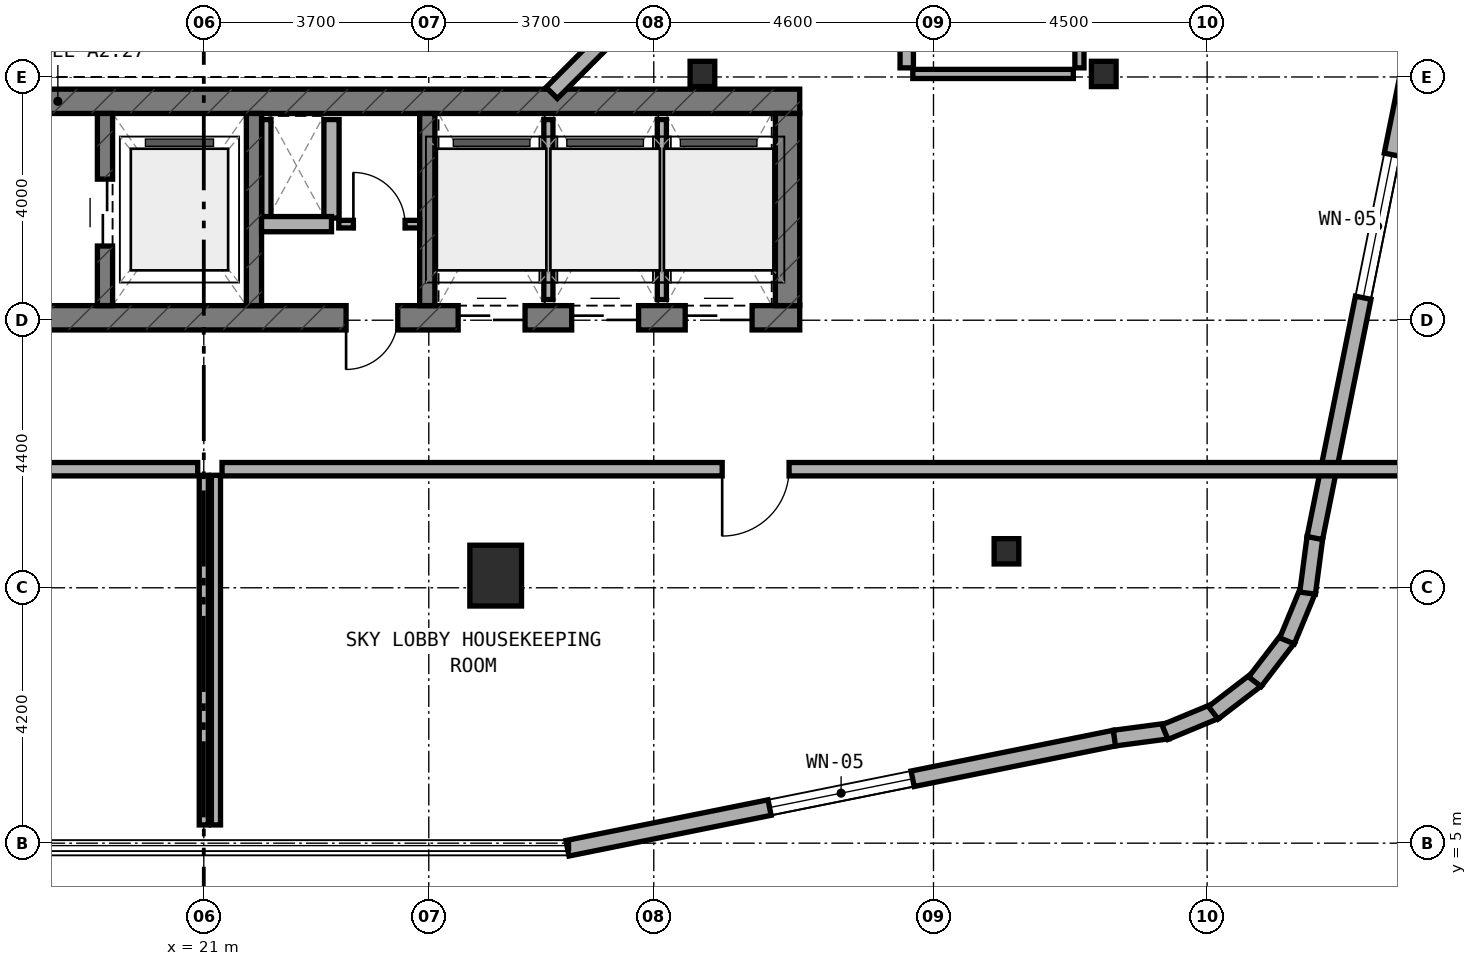
"""IFC4 building model, lengths in metres.
Left out: names, types, materials, properties, quantities, classifications, styles, units other than length and angle.
Written with IfcOpenShell. Run it as: python <this file> out.ifc"""

import sys

from ifc_helpers import new_model, si_unit, direction, frame, frame_2d, origin, origin_2d, place, context, subcontext, project, spatial, rectangle, i_section, extrude, element, fill, save


model = new_model("IFC4")
c1 = context("Model", 3, precision=1e-05, world=origin(), true_north=direction((0.0, 1.0)))
c2 = subcontext(c1, "Body", "Model", "MODEL_VIEW")
j1 = project(units=[si_unit("LENGTHUNIT", "METRE"), si_unit("PLANEANGLEUNIT", "RADIAN")], contexts=[c1])
p1 = place(None, origin())
s1 = spatial("IfcSite", under=j1, at=p1, CompositionType="ELEMENT")
p2 = place(p1, origin())
s2 = spatial("IfcBuilding", under=s1, at=p2, CompositionType="ELEMENT")
p3 = place(p2, frame((0.0, 0.0, 119.5)))
s3 = spatial("IfcBuildingStorey", under=s2, at=p3, CompositionType="ELEMENT", Elevation=119.5)
p4 = place(p3, frame((6.4, 13.64, 0.0), z_axis=(0.0, 0.0, 1.0), x_axis=(1.0, 0.0, 0.0)))
e1 = element("IfcWall", 1, at=p4, inside=s3, PredefinedType="SHEAR", context=c2, shape_type="SweptSolid", body=[
    extrude(rectangle(XDim=24.4, YDim=0.4, at=frame_2d((12.2, 0.0))), origin(), (0.0, 0.0, 1.0), 4.5),
])
p5 = place(p4, frame((9.15, 0.0, 0.0)))
e2 = element("IfcOpeningElement", 2, at=p5, cuts=e1, PredefinedType="OPENING", context=c2, shape_type="SweptSolid", body=[
    extrude(rectangle(XDim=1.2, YDim=2.15, at=frame_2d((0.6, 1.075))), frame((0.0, 0.21, 0.0), z_axis=(0.0, -1.0, 0.0), x_axis=(1.0, 0.0, 0.0)), (0.0, 0.0, 1.0), 0.42),
])
p6 = place(p4, frame((16.94, 0.0, 0.0)))
e3 = element("IfcOpeningElement", 3, at=p6, cuts=e1, PredefinedType="OPENING", context=c2, shape_type="SweptSolid", body=[
    extrude(rectangle(XDim=0.85, YDim=2.1, at=frame_2d((0.425, 1.05))), frame((0.0, 0.21, 0.0), z_axis=(0.0, -1.0, 0.0), x_axis=(1.0, 0.0, 0.0)), (0.0, 0.0, 1.0), 0.42),
])
p7 = place(p4, frame((18.783, 0.0, 0.0)))
e4 = element("IfcOpeningElement", 4, at=p7, cuts=e1, PredefinedType="OPENING", context=c2, shape_type="SweptSolid", body=[
    extrude(rectangle(XDim=1.1, YDim=2.15, at=frame_2d((0.55, 1.075))), frame((0.0, 0.21, 0.0), z_axis=(0.0, -1.0, 0.0), x_axis=(1.0, 0.0, 0.0)), (0.0, 0.0, 1.0), 0.42),
])
p8 = place(p4, frame((20.65, 0.0, 0.0)))
e5 = element("IfcOpeningElement", 5, at=p8, cuts=e1, PredefinedType="OPENING", context=c2, shape_type="SweptSolid", body=[
    extrude(rectangle(XDim=1.1, YDim=2.15, at=frame_2d((0.55, 1.075))), frame((0.0, 0.21, 0.0), z_axis=(0.0, -1.0, 0.0), x_axis=(1.0, 0.0, 0.0)), (0.0, 0.0, 1.0), 0.42),
])
p9 = place(p4, frame((22.517, 0.0, 0.0)))
e6 = element("IfcOpeningElement", 6, at=p9, cuts=e1, PredefinedType="OPENING", context=c2, shape_type="SweptSolid", body=[
    extrude(rectangle(XDim=1.1, YDim=2.15, at=frame_2d((0.55, 1.075))), frame((0.0, 0.21, 0.0), z_axis=(0.0, -1.0, 0.0), x_axis=(1.0, 0.0, 0.0)), (0.0, 0.0, 1.0), 0.42),
])
p10 = place(p3, frame((6.4, 17.2, 0.0), z_axis=(0.0, 0.0, 1.0), x_axis=(1.0, 0.0, 0.0)))
e7 = element("IfcWall", 7, at=p10, inside=s3, PredefinedType="SHEAR", context=c2, shape_type="SweptSolid", body=[
    extrude(rectangle(XDim=24.4, YDim=0.4, at=frame_2d((12.2, 0.0))), origin(), (0.0, 0.0, 1.0), 4.5),
])
p11 = place(p3, frame((30.6, 13.84, 0.0), z_axis=(0.0, 0.0, 1.0), x_axis=(0.0, 1.0, 0.0)))
e8 = element("IfcWall", 8, at=p11, inside=s3, PredefinedType="SHEAR", context=c2, shape_type="SweptSolid", body=[
    extrude(rectangle(XDim=3.16, YDim=0.4, at=frame_2d((1.58, 0.0))), origin(), (0.0, 0.0, 1.0), 4.5),
])
p12 = place(p3, frame((19.375, 13.84, 0.0), z_axis=(0.0, 0.0, 1.0), x_axis=(0.0, 1.0, 0.0)))
e9 = element("IfcWall", 9, at=p12, inside=s3, PredefinedType="STANDARD", context=c2, shape_type="SweptSolid", body=[
    extrude(rectangle(XDim=3.16, YDim=0.25, at=frame_2d((1.58, 0.0))), origin(), (0.0, 0.0, 1.0), 4.22),
])
p13 = place(p12, frame((0.98, 0.0, 0.0)))
e10 = element("IfcOpeningElement", 10, at=p13, cuts=e9, PredefinedType="OPENING", context=c2, shape_type="SweptSolid", body=[
    extrude(rectangle(XDim=1.1, YDim=2.15, at=frame_2d((0.55, 1.075))), frame((0.0, 0.135, 0.0), z_axis=(0.0, -1.0, 0.0), x_axis=(1.0, 0.0, 0.0)), (0.0, 0.0, 1.0), 0.27),
])
for number, where, z_axis, x_axis in (
    (11, (21.825, 13.84, 0.0), (0.0, 0.0, 1.0), (0.0, 1.0, 0.0)),
    (12, (24.675, 13.84, 0.0), (0.0, 0.0, 1.0), (0.0, 1.0, 0.0)),
):
    element("IfcWall", number, at=place(p3, frame(where, z_axis=z_axis, x_axis=x_axis)), inside=s3, PredefinedType="STANDARD", context=c2, shape_type="SweptSolid", body=[
        extrude(rectangle(XDim=3.16, YDim=0.25, at=frame_2d((1.58, 0.0))), origin(), (0.0, 0.0, 1.0), 4.22),
    ])
p14 = place(p3, frame((25.8, 9.4, 0.0), z_axis=(0.0, 0.0, 1.0), x_axis=(1.0, 0.0, 0.0)))
e13 = element("IfcColumn", 13, at=p14, inside=s3, PredefinedType="COLUMN", context=c2, shape_type="SweptSolid", body=[
    extrude(rectangle(XDim=0.85, YDim=1.0, at=origin_2d()), origin(), (0.0, 0.0, 1.0), 4.5),
])
for number, where, z_axis, x_axis in (
    (14, (34.2, 9.8, 0.0), (0.0, 0.0, 1.0), (1.0, 0.0, 0.0)),
    (15, (35.8, 17.65, 0.0), (0.0, 0.0, 1.0), (1.0, 0.0, 0.0)),
    (16, (29.2, 17.65, 0.0), (0.0, 0.0, 1.0), (1.0, 0.0, 0.0)),
):
    element("IfcColumn", number, at=place(p3, frame(where, z_axis=z_axis, x_axis=x_axis)), inside=s3, PredefinedType="COLUMN", context=c2, shape_type="SweptSolid", body=[
        extrude(i_section(OverallWidth=0.406, OverallDepth=0.416, WebThickness=0.024, FlangeThickness=0.039, FilletRadius=0.015, at=origin_2d()), origin(), (0.0, 0.0, 1.0), 4.5),
    ])
p15 = place(p3, frame((26.98, 4.916, 0.0), z_axis=(0.0, 0.0, 1.0), x_axis=(0.980315963543, 0.197435082048, 0.0)))
e17 = element("IfcWall", 17, at=p15, inside=s3, PredefinedType="STANDARD", context=c2, shape_type="SweptSolid", body=[
    extrude(rectangle(XDim=9.183, YDim=0.26, at=frame_2d((4.591, 0.0))), origin(), (0.0, 0.0, 1.0), 4.22),
])
p16 = place(p15, frame((3.391, 0.0, 0.8)))
e18 = element("IfcOpeningElement", 18, at=p16, cuts=e17, PredefinedType="OPENING", context=c2, shape_type="SweptSolid", body=[
    extrude(rectangle(XDim=2.4, YDim=1.6, at=frame_2d((1.2, 0.8))), frame((0.0, 0.14, 0.0), z_axis=(0.0, -1.0, 0.0), x_axis=(1.0, 0.0, 0.0)), (0.0, 0.0, 1.0), 0.28),
])
p17 = place(p3, frame((35.975, 6.728, 0.0), z_axis=(0.0, 0.0, 1.0), x_axis=(0.991388484223, 0.130953706898, 0.0)))
e19 = element("IfcWall", 19, at=p17, inside=s3, PredefinedType="STANDARD", context=c2, shape_type="SweptSolid", body=[
    extrude(rectangle(XDim=0.885, YDim=0.26, at=frame_2d((0.443, 0.0))), origin(), (0.0, 0.0, 1.0), 4.22),
])
p18 = place(p3, frame((36.807, 6.826, 0.0), z_axis=(0.0, 0.0, 1.0), x_axis=(0.923627776508, 0.383290660547, 0.0)))
e20 = element("IfcWall", 20, at=p18, inside=s3, PredefinedType="STANDARD", context=c2, shape_type="SweptSolid", body=[
    extrude(rectangle(XDim=0.903, YDim=0.26, at=frame_2d((0.452, 0.0))), origin(), (0.0, 0.0, 1.0), 4.22),
])
p19 = place(p3, frame((37.601, 7.144, 0.0), z_axis=(0.0, 0.0, 1.0), x_axis=(0.793458244748, 0.608624690463, 0.0)))
e21 = element("IfcWall", 21, at=p19, inside=s3, PredefinedType="STANDARD", context=c2, shape_type="SweptSolid", body=[
    extrude(rectangle(XDim=0.902, YDim=0.26, at=frame_2d((0.451, 0.0))), origin(), (0.0, 0.0, 1.0), 4.22),
])
p20 = place(p3, frame((38.286, 7.655, 0.0), z_axis=(0.0, 0.0, 1.0), x_axis=(0.608494022858, 0.793558456666, 0.0)))
e22 = element("IfcWall", 22, at=p20, inside=s3, PredefinedType="STANDARD", context=c2, shape_type="SweptSolid", body=[
    extrude(rectangle(XDim=0.902, YDim=0.26, at=frame_2d((0.451, 0.0))), origin(), (0.0, 0.0, 1.0), 4.22),
])
p21 = place(p3, frame((38.814, 8.327, 0.0), z_axis=(0.0, 0.0, 1.0), x_axis=(0.383155708213, 0.923683767999, 0.0)))
e23 = element("IfcWall", 23, at=p21, inside=s3, PredefinedType="STANDARD", context=c2, shape_type="SweptSolid", body=[
    extrude(rectangle(XDim=0.903, YDim=0.26, at=frame_2d((0.451, 0.0))), origin(), (0.0, 0.0, 1.0), 4.22),
])
p22 = place(p3, frame((39.152, 9.112, 0.0), z_axis=(0.0, 0.0, 1.0), x_axis=(0.130200706103, 0.991487658083, 0.0)))
e24 = element("IfcWall", 24, at=p22, inside=s3, PredefinedType="STANDARD", context=c2, shape_type="SweptSolid", body=[
    extrude(rectangle(XDim=0.921, YDim=0.26, at=frame_2d((0.46, 0.0))), origin(), (0.0, 0.0, 1.0), 4.22),
])
p23 = place(p3, frame((39.271, 10.018, 0.0), z_axis=(0.0, 0.0, 1.0), x_axis=(0.197435082048, 0.980315963543, 0.0)))
e25 = element("IfcWall", 25, at=p23, inside=s3, PredefinedType="STANDARD", context=c2, shape_type="SweptSolid", body=[
    extrude(rectangle(XDim=9.183, YDim=0.26, at=frame_2d((4.591, 0.0))), origin(), (0.0, 0.0, 1.0), 4.22),
])
p24 = place(p23, frame((4.031, 0.0, 0.8)))
e26 = element("IfcOpeningElement", 26, at=p24, cuts=e25, PredefinedType="OPENING", context=c2, shape_type="SweptSolid", body=[
    extrude(rectangle(XDim=2.4, YDim=1.6, at=frame_2d((1.2, 0.8))), frame((0.0, 0.14, 0.0), z_axis=(0.0, -1.0, 0.0), x_axis=(1.0, 0.0, 0.0)), (0.0, 0.0, 1.0), 0.28),
])
p25 = place(p3, frame((26.722, 17.338, 0.0), z_axis=(0.0, 0.0, 1.0), x_axis=(0.707059717605, 0.707153841636, 0.0)))
e27 = element("IfcWall", 27, at=p25, inside=s3, PredefinedType="STANDARD", context=c2, shape_type="SweptSolid", body=[
    extrude(rectangle(XDim=2.594, YDim=0.26, at=frame_2d((1.297, 0.0))), origin(), (0.0, 0.0, 1.0), 4.22),
])
p26 = place(p3, frame((22.03, 15.28, 0.0), z_axis=(0.0, 0.0, 1.0), x_axis=(0.0, 1.0, 0.0)))
e28 = element("IfcWall", 28, at=p26, inside=s3, PredefinedType="PARTITIONING", context=c2, shape_type="SweptSolid", body=[
    extrude(rectangle(XDim=1.62, YDim=0.15, at=frame_2d((0.81, 0.0))), origin(), (0.0, 0.0, 1.0), 4.22),
])
p27 = place(p3, frame((23.1, 15.28, 0.0), z_axis=(0.0, 0.0, 1.0), x_axis=(0.0, 1.0, 0.0)))
e29 = element("IfcWall", 29, at=p27, inside=s3, PredefinedType="SOLIDWALL", context=c2, shape_type="SweptSolid", body=[
    extrude(rectangle(XDim=1.62, YDim=0.25, at=frame_2d((0.81, 0.0))), origin(), (0.0, 0.0, 1.0), 4.22),
])
p28 = place(p3, frame((21.95, 15.18, 0.0), z_axis=(0.0, 0.0, 1.0), x_axis=(1.0, 0.0, 0.0)))
e30 = element("IfcWall", 30, at=p28, inside=s3, PredefinedType="SOLIDWALL", context=c2, shape_type="SweptSolid", body=[
    extrude(rectangle(XDim=1.15, YDim=0.25, at=frame_2d((0.575, 0.0))), origin(), (0.0, 0.0, 1.0), 4.22),
])
p29 = place(p3, frame((23.22, 15.18, 0.0), z_axis=(0.0, 0.0, 1.0), x_axis=(1.0, 0.0, 0.0)))
e31 = element("IfcWall", 31, at=p29, inside=s3, PredefinedType="PARTITIONING", context=c2, shape_type="SweptSolid", body=[
    extrude(rectangle(XDim=1.33, YDim=0.125, at=frame_2d((0.665, 0.0))), origin(), (0.0, 0.0, 1.0), 4.22),
])
p30 = place(p29, frame((0.24, 0.0, 0.0)))
e32 = element("IfcOpeningElement", 32, at=p30, cuts=e31, PredefinedType="OPENING", context=c2, shape_type="SweptSolid", body=[
    extrude(rectangle(XDim=0.85, YDim=2.1, at=frame_2d((0.425, 1.05))), frame((0.0, 0.073, 0.0), z_axis=(0.0, -1.0, 0.0), x_axis=(1.0, 0.0, 0.0)), (0.0, 0.0, 1.0), 0.145),
])
p31 = place(p3, frame((26.667, 13.94, 0.0), z_axis=(0.0, 0.0, 1.0), x_axis=(0.0, 1.0, 0.0)))
e33 = element("IfcWall", 33, at=p31, inside=s3, PredefinedType="PARTITIONING", context=c2, shape_type="SweptSolid", body=[
    extrude(rectangle(XDim=2.96, YDim=0.15, at=frame_2d((1.48, 0.0))), origin(), (0.0, 0.0, 1.0), 4.22),
])
p32 = place(p3, frame((28.533, 13.94, 0.0), z_axis=(0.0, 0.0, 1.0), x_axis=(0.0, 1.0, 0.0)))
e34 = element("IfcWall", 34, at=p32, inside=s3, PredefinedType="PARTITIONING", context=c2, shape_type="SweptSolid", body=[
    extrude(rectangle(XDim=2.96, YDim=0.15, at=frame_2d((1.48, 0.0))), origin(), (0.0, 0.0, 1.0), 3.695),
])
p33 = place(p3, frame((35.4, 17.75, 0.0), z_axis=(0.0, 0.0, 1.0), x_axis=(0.0, 1.0, 0.0)))
e35 = element("IfcWall", 35, at=p33, inside=s3, PredefinedType="PARTITIONING", context=c2, shape_type="SweptSolid", body=[
    extrude(rectangle(XDim=3.35, YDim=0.15, at=frame_2d((1.675, 0.0))), origin(), (0.0, 0.0, 1.0), 4.22),
])
p34 = place(p3, frame((32.66, 17.65, 0.0), z_axis=(0.0, 0.0, 1.0), x_axis=(1.0, 0.0, 0.0)))
e36 = element("IfcWall", 36, at=p34, inside=s3, PredefinedType="PARTITIONING", context=c2, shape_type="SweptSolid", body=[
    extrude(rectangle(XDim=2.64, YDim=0.15, at=frame_2d((1.32, 0.0))), origin(), (0.0, 0.0, 1.0), 3.695),
])
p35 = place(p3, frame((32.56, 17.75, 0.0), z_axis=(0.0, 0.0, 1.0), x_axis=(0.0, 1.0, 0.0)))
e37 = element("IfcWall", 37, at=p35, inside=s3, PredefinedType="SOLIDWALL", context=c2, shape_type="SweptSolid", body=[
    extrude(rectangle(XDim=3.35, YDim=0.22, at=frame_2d((1.675, 0.0))), origin(), (0.0, 0.0, 1.0), 4.22),
])
p36 = place(p35, frame((1.003, 0.0, 0.0)))
e38 = element("IfcOpeningElement", 38, at=p36, cuts=e37, PredefinedType="OPENING", context=c2, shape_type="SweptSolid", body=[
    extrude(rectangle(XDim=1.1, YDim=2.1, at=frame_2d((0.55, 1.05))), frame((0.0, 0.12, 0.0), z_axis=(0.0, -1.0, 0.0), x_axis=(1.0, 0.0, 0.0)), (0.0, 0.0, 1.0), 0.24),
])
p37 = place(p3, frame((21.0, 5.3, 0.0), z_axis=(0.0, 0.0, 1.0), x_axis=(0.0, 1.0, 0.0)))
e39 = element("IfcWall", 39, at=p37, inside=s3, PredefinedType="PARTITIONING", context=c2, shape_type="SweptSolid", body=[
    extrude(rectangle(XDim=5.75, YDim=0.15, at=frame_2d((2.875, 0.0))), origin(), (0.0, 0.0, 1.0), 3.835),
])
p38 = place(p3, frame((1.3, 11.15, 0.0), z_axis=(0.0, 0.0, 1.0), x_axis=(1.0, 0.0, 0.0)))
e40 = element("IfcWall", 40, at=p38, inside=s3, PredefinedType="SOLIDWALL", context=c2, shape_type="SweptSolid", body=[
    extrude(rectangle(XDim=19.6, YDim=0.22, at=frame_2d((9.8, 0.0))), origin(), (0.0, 0.0, 1.0), 3.695),
])
p39 = place(p38, frame((8.315, 0.0, 0.0)))
e41 = element("IfcOpeningElement", 41, at=p39, cuts=e40, PredefinedType="OPENING", context=c2, shape_type="SweptSolid", body=[
    extrude(rectangle(XDim=1.1, YDim=2.1, at=frame_2d((0.55, 1.05))), frame((0.0, 0.12, 0.0), z_axis=(0.0, -1.0, 0.0), x_axis=(1.0, 0.0, 0.0)), (0.0, 0.0, 1.0), 0.24),
])
p40 = place(p3, frame((21.2, 5.3, 0.0), z_axis=(0.0, 0.0, 1.0), x_axis=(0.0, 1.0, 0.0)))
e42 = element("IfcWall", 42, at=p40, inside=s3, PredefinedType="PARTITIONING", context=c2, shape_type="SweptSolid", body=[
    extrude(rectangle(XDim=5.75, YDim=0.15, at=frame_2d((2.875, 0.0))), origin(), (0.0, 0.0, 1.0), 3.835),
])
p41 = place(p3, frame((21.3, 11.15, 0.0), z_axis=(0.0, 0.0, 1.0), x_axis=(1.0, 0.0, 0.0)))
e43 = element("IfcWall", 43, at=p41, inside=s3, PredefinedType="SOLIDWALL", context=c2, shape_type="SweptSolid", body=[
    extrude(rectangle(XDim=19.4, YDim=0.22, at=frame_2d((9.7, 0.0))), origin(), (0.0, 0.0, 1.0), 3.695),
])
p42 = place(p41, frame((8.225, 0.0, 0.0)))
e44 = element("IfcOpeningElement", 44, at=p42, cuts=e43, PredefinedType="OPENING", context=c2, shape_type="SweptSolid", body=[
    extrude(rectangle(XDim=1.1, YDim=2.1, at=frame_2d((0.55, 1.05))), frame((0.0, 0.12, 0.0), z_axis=(0.0, -1.0, 0.0), x_axis=(1.0, 0.0, 0.0)), (0.0, 0.0, 1.0), 0.24),
])
p43 = place(p16, origin())
e45 = element("IfcWindow", 45, at=p43, inside=s3, PartitioningType="SINGLE_PANEL", PredefinedType="WINDOW", context=c2, shape_type="SweptSolid", body=[
    extrude(rectangle(XDim=2.4, YDim=1.6, at=frame_2d((1.2, 0.8))), frame((0.0, 0.03, 0.0), z_axis=(0.0, -1.0, 0.0), x_axis=(1.0, 0.0, 0.0)), (0.0, 0.0, 1.0), 0.06),
])
fill(e18, e45)
p44 = place(p24, origin())
e46 = element("IfcWindow", 46, at=p44, inside=s3, PartitioningType="SINGLE_PANEL", PredefinedType="WINDOW", context=c2, shape_type="SweptSolid", body=[
    extrude(rectangle(XDim=2.4, YDim=1.6, at=frame_2d((1.2, 0.8))), frame((0.0, 0.03, 0.0), z_axis=(0.0, -1.0, 0.0), x_axis=(1.0, 0.0, 0.0)), (0.0, 0.0, 1.0), 0.06),
])
fill(e26, e46)
p45 = place(p13, origin())
e47 = element("IfcDoor", 47, at=p45, inside=s3, OperationType="DOUBLE_DOOR_SLIDING", PredefinedType="DOOR", context=c2, shape_type="SweptSolid", body=[
    extrude(rectangle(XDim=1.1, YDim=2.15, at=frame_2d((0.55, 1.075))), frame((0.0, 0.025, 0.0), z_axis=(0.0, -1.0, 0.0), x_axis=(1.0, 0.0, 0.0)), (0.0, 0.0, 1.0), 0.05),
])
fill(e10, e47)
p46 = place(p6, frame((0.85, 0.0, 0.0), z_axis=(0.0, 0.0, 1.0), x_axis=(-1.0, 0.0, 0.0)))
e48 = element("IfcDoor", 48, at=p46, inside=s3, OperationType="SINGLE_SWING_RIGHT", PredefinedType="DOOR", context=c2, shape_type="SweptSolid", body=[
    extrude(rectangle(XDim=0.85, YDim=2.1, at=frame_2d((0.425, 1.05))), frame((0.0, 0.025, 0.0), z_axis=(0.0, -1.0, 0.0), x_axis=(1.0, 0.0, 0.0)), (0.0, 0.0, 1.0), 0.05),
])
fill(e3, e48)
p47 = place(p7, frame((1.1, 0.0, 0.0), z_axis=(0.0, 0.0, 1.0), x_axis=(-1.0, 0.0, 0.0)))
e49 = element("IfcDoor", 49, at=p47, inside=s3, OperationType="DOUBLE_DOOR_SLIDING", PredefinedType="DOOR", context=c2, shape_type="SweptSolid", body=[
    extrude(rectangle(XDim=1.1, YDim=2.15, at=frame_2d((0.55, 1.075))), frame((0.0, 0.025, 0.0), z_axis=(0.0, -1.0, 0.0), x_axis=(1.0, 0.0, 0.0)), (0.0, 0.0, 1.0), 0.05),
])
fill(e4, e49)
p48 = place(p8, frame((1.1, 0.0, 0.0), z_axis=(0.0, 0.0, 1.0), x_axis=(-1.0, 0.0, 0.0)))
e50 = element("IfcDoor", 50, at=p48, inside=s3, OperationType="DOUBLE_DOOR_SLIDING", PredefinedType="DOOR", context=c2, shape_type="SweptSolid", body=[
    extrude(rectangle(XDim=1.1, YDim=2.15, at=frame_2d((0.55, 1.075))), frame((0.0, 0.025, 0.0), z_axis=(0.0, -1.0, 0.0), x_axis=(1.0, 0.0, 0.0)), (0.0, 0.0, 1.0), 0.05),
])
fill(e5, e50)
p49 = place(p9, frame((1.1, 0.0, 0.0), z_axis=(0.0, 0.0, 1.0), x_axis=(-1.0, 0.0, 0.0)))
e51 = element("IfcDoor", 51, at=p49, inside=s3, OperationType="DOUBLE_DOOR_SLIDING", PredefinedType="DOOR", context=c2, shape_type="SweptSolid", body=[
    extrude(rectangle(XDim=1.1, YDim=2.15, at=frame_2d((0.55, 1.075))), frame((0.0, 0.025, 0.0), z_axis=(0.0, -1.0, 0.0), x_axis=(1.0, 0.0, 0.0)), (0.0, 0.0, 1.0), 0.05),
])
fill(e6, e51)
p50 = place(p30, origin())
e52 = element("IfcDoor", 52, at=p50, inside=s3, OperationType="SINGLE_SWING_LEFT", PredefinedType="DOOR", context=c2, shape_type="SweptSolid", body=[
    extrude(rectangle(XDim=0.85, YDim=2.1, at=frame_2d((0.425, 1.05))), frame((0.0, 0.025, 0.0), z_axis=(0.0, -1.0, 0.0), x_axis=(1.0, 0.0, 0.0)), (0.0, 0.0, 1.0), 0.05),
])
fill(e32, e52)
p51 = place(p42, frame((1.1, 0.0, 0.0), z_axis=(0.0, 0.0, 1.0), x_axis=(-1.0, 0.0, 0.0)))
e53 = element("IfcDoor", 53, at=p51, inside=s3, OperationType="SINGLE_SWING_RIGHT", PredefinedType="DOOR", context=c2, shape_type="SweptSolid", body=[
    extrude(rectangle(XDim=1.1, YDim=2.1, at=frame_2d((0.55, 1.05))), frame((0.0, 0.025, 0.0), z_axis=(0.0, -1.0, 0.0), x_axis=(1.0, 0.0, 0.0)), (0.0, 0.0, 1.0), 0.05),
])
fill(e44, e53)
save(model, sys.argv[1])
